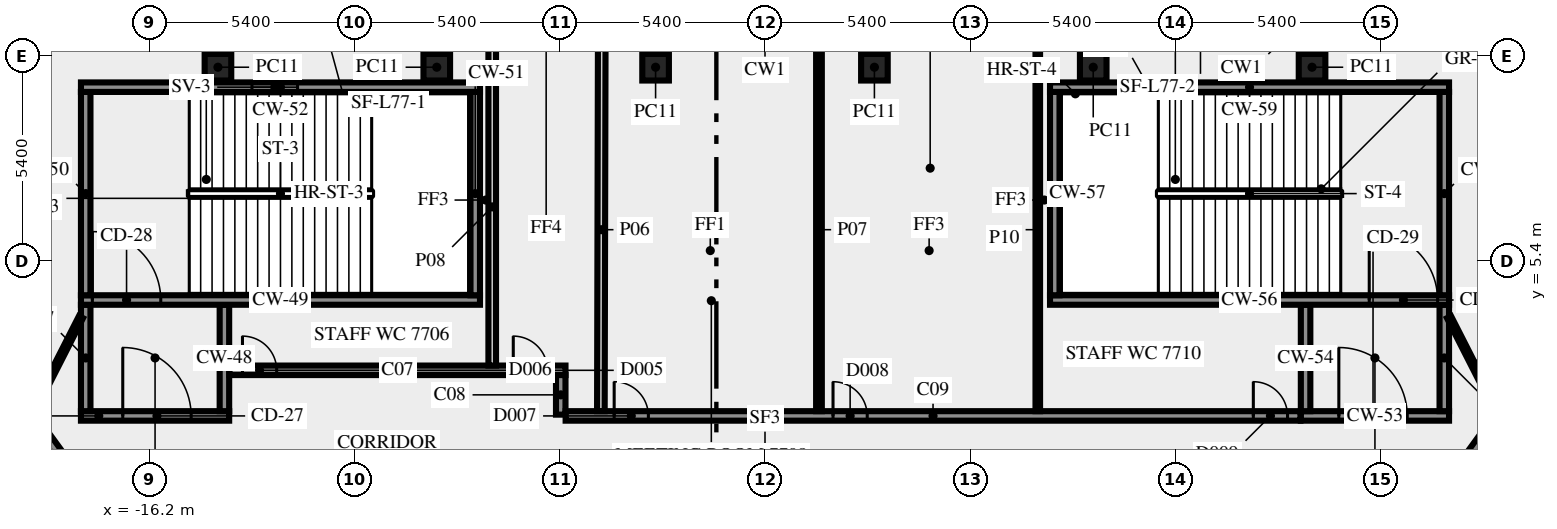
"""IFC4 building model, lengths in metres.
Left out: names, types, materials, properties, quantities, classifications, styles, units other than length and angle.
Written with IfcOpenShell. Run it as: python <this file> out.ifc"""

import sys

from ifc_helpers import new_model, si_unit, direction, frame, frame_2d, origin, origin_2d, place, context, subcontext, project, spatial, rectangle, extrude, element, fill, save


model = new_model("IFC4")
c1 = context("Model", 3, precision=1e-05, world=origin(), true_north=direction((0.0, 1.0)))
c2 = subcontext(c1, "Body", "Model", "MODEL_VIEW")
j1 = project(units=[si_unit("LENGTHUNIT", "METRE"), si_unit("PLANEANGLEUNIT", "RADIAN")], contexts=[c1])
p1 = place(None, origin())
s1 = spatial("IfcSite", under=j1, at=p1, CompositionType="ELEMENT")
p2 = place(p1, origin())
s2 = spatial("IfcBuilding", under=s1, at=p2, CompositionType="ELEMENT")
p3 = place(p2, frame((0.0, 0.0, 331.0)))
s3 = spatial("IfcBuildingStorey", under=s2, at=p3, CompositionType="ELEMENT", Elevation=331.0)
for number, where, z_axis, x_axis in (
    (1, (14.395, 10.5, 0.0), (0.0, 0.0, 1.0), (-1.0, 0.0, 0.0)),
    (2, (8.637, 10.5, 0.0), (0.0, 0.0, 1.0), (-1.0, 0.0, 0.0)),
    (3, (2.879, 10.5, 0.0), (0.0, 0.0, 1.0), (-1.0, 0.0, 0.0)),
    (4, (-2.879, 10.5, 0.0), (0.0, 0.0, 1.0), (-1.0, 0.0, 0.0)),
    (5, (-8.637, 10.5, 0.0), (0.0, 0.0, 1.0), (-1.0, 0.0, 0.0)),
    (6, (-14.395, 10.5, 0.0), (0.0, 0.0, 1.0), (-1.0, 0.0, 0.0)),
):
    element("IfcColumn", number, at=place(p3, frame(where, z_axis=z_axis, x_axis=x_axis)), inside=s3, PredefinedType="COLUMN", context=c2, shape_type="SweptSolid", body=[
        extrude(rectangle(XDim=0.7, YDim=0.7, at=origin_2d()), origin(), (0.0, 0.0, 1.0), 3.65),
    ])
p4 = place(p3, frame((-18.0, 1.325, 0.0), z_axis=(0.0, 0.0, 1.0), x_axis=(1.0, 0.0, 0.0)))
e7 = element("IfcWall", 7, at=p4, inside=s3, PredefinedType="SHEAR", context=c2, shape_type="SweptSolid", body=[
    extrude(rectangle(XDim=3.9, YDim=0.25, at=frame_2d((1.95, 0.0))), origin(), (0.0, 0.0, 1.0), 3.65),
])
p5 = place(p4, frame((1.1, 0.0, 0.0)))
e8 = element("IfcOpeningElement", 8, at=p5, cuts=e7, PredefinedType="OPENING", context=c2, shape_type="SweptSolid", body=[
    extrude(rectangle(XDim=1.8, YDim=2.1, at=frame_2d((0.9, 1.05))), frame((0.0, 0.135, 0.0), z_axis=(0.0, -1.0, 0.0), x_axis=(1.0, 0.0, 0.0)), (0.0, 0.0, 1.0), 0.27),
])
for number, where, z_axis, x_axis in (
    (9, (-17.875, 1.45, 0.0), (0.0, 0.0, 1.0), (0.0, 1.0, 0.0)),
    (10, (-14.225, 1.45, 0.0), (0.0, 0.0, 1.0), (0.0, 1.0, 0.0)),
):
    element("IfcWall", number, at=place(p3, frame(where, z_axis=z_axis, x_axis=x_axis)), inside=s3, PredefinedType="SHEAR", context=c2, shape_type="SweptSolid", body=[
        extrude(rectangle(XDim=2.8, YDim=0.25, at=frame_2d((1.4, 0.0))), origin(), (0.0, 0.0, 1.0), 3.65),
    ])
p6 = place(p3, frame((-18.0, 4.375, 0.0), z_axis=(0.0, 0.0, 1.0), x_axis=(1.0, 0.0, 0.0)))
e11 = element("IfcWall", 11, at=p6, inside=s3, PredefinedType="SHEAR", context=c2, shape_type="SweptSolid", body=[
    extrude(rectangle(XDim=10.5, YDim=0.25, at=frame_2d((5.25, 0.0))), origin(), (0.0, 0.0, 1.0), 3.65),
])
p7 = place(p6, frame((0.3, 0.0, 0.0)))
e12 = element("IfcOpeningElement", 12, at=p7, cuts=e11, PredefinedType="OPENING", context=c2, shape_type="SweptSolid", body=[
    extrude(rectangle(XDim=1.8, YDim=2.1, at=frame_2d((0.9, 1.05))), frame((0.0, 0.135, 0.0), z_axis=(0.0, -1.0, 0.0), x_axis=(1.0, 0.0, 0.0)), (0.0, 0.0, 1.0), 0.27),
])
for number, where, z_axis, x_axis in (
    (13, (-17.875, 4.5, 0.0), (0.0, 0.0, 1.0), (0.0, 1.0, 0.0)),
    (14, (-7.625, 4.5, 0.0), (0.0, 0.0, 1.0), (0.0, 1.0, 0.0)),
):
    element("IfcWall", number, at=place(p3, frame(where, z_axis=z_axis, x_axis=x_axis)), inside=s3, PredefinedType="SHEAR", context=c2, shape_type="SweptSolid", body=[
        extrude(rectangle(XDim=5.35, YDim=0.25, at=frame_2d((2.675, 0.0))), origin(), (0.0, 0.0, 1.0), 3.65),
    ])
p8 = place(p3, frame((-18.0, 9.975, 0.0), z_axis=(0.0, 0.0, 1.0), x_axis=(1.0, 0.0, 0.0)))
e15 = element("IfcWall", 15, at=p8, inside=s3, PredefinedType="SHEAR", context=c2, shape_type="SweptSolid", body=[
    extrude(rectangle(XDim=10.5, YDim=0.25, at=frame_2d((5.25, 0.0))), origin(), (0.0, 0.0, 1.0), 3.65),
])
p9 = place(p8, frame((4.5, 0.0, 1.0)))
e16 = element("IfcOpeningElement", 16, at=p9, cuts=e15, PredefinedType="OPENING", context=c2, shape_type="SweptSolid", body=[
    extrude(rectangle(XDim=1.2, YDim=1.2, at=frame_2d((0.6, 0.6))), frame((0.0, 0.135, 0.0), z_axis=(0.0, -1.0, 0.0), x_axis=(1.0, 0.0, 0.0)), (0.0, 0.0, 1.0), 0.27),
])
p10 = place(p3, frame((14.1, 1.325, 0.0), z_axis=(0.0, 0.0, 1.0), x_axis=(1.0, 0.0, 0.0)))
e17 = element("IfcWall", 17, at=p10, inside=s3, PredefinedType="SHEAR", context=c2, shape_type="SweptSolid", body=[
    extrude(rectangle(XDim=3.9, YDim=0.25, at=frame_2d((1.95, 0.0))), origin(), (0.0, 0.0, 1.0), 3.65),
])
p11 = place(p10, frame((1.0, 0.0, 0.0)))
e18 = element("IfcOpeningElement", 18, at=p11, cuts=e17, PredefinedType="OPENING", context=c2, shape_type="SweptSolid", body=[
    extrude(rectangle(XDim=1.8, YDim=2.1, at=frame_2d((0.9, 1.05))), frame((0.0, 0.135, 0.0), z_axis=(0.0, -1.0, 0.0), x_axis=(1.0, 0.0, 0.0)), (0.0, 0.0, 1.0), 0.27),
])
for number, where, z_axis, x_axis in (
    (19, (14.225, 1.45, 0.0), (0.0, 0.0, 1.0), (0.0, 1.0, 0.0)),
    (20, (17.875, 1.45, 0.0), (0.0, 0.0, 1.0), (0.0, 1.0, 0.0)),
):
    element("IfcWall", number, at=place(p3, frame(where, z_axis=z_axis, x_axis=x_axis)), inside=s3, PredefinedType="SHEAR", context=c2, shape_type="SweptSolid", body=[
        extrude(rectangle(XDim=2.8, YDim=0.25, at=frame_2d((1.4, 0.0))), origin(), (0.0, 0.0, 1.0), 3.65),
    ])
p12 = place(p3, frame((7.5, 4.375, 0.0), z_axis=(0.0, 0.0, 1.0), x_axis=(1.0, 0.0, 0.0)))
e21 = element("IfcWall", 21, at=p12, inside=s3, PredefinedType="SHEAR", context=c2, shape_type="SweptSolid", body=[
    extrude(rectangle(XDim=10.5, YDim=0.25, at=frame_2d((5.25, 0.0))), origin(), (0.0, 0.0, 1.0), 3.65),
])
p13 = place(p12, frame((8.4, 0.0, 0.0)))
e22 = element("IfcOpeningElement", 22, at=p13, cuts=e21, PredefinedType="OPENING", context=c2, shape_type="SweptSolid", body=[
    extrude(rectangle(XDim=1.8, YDim=2.1, at=frame_2d((0.9, 1.05))), frame((0.0, 0.135, 0.0), z_axis=(0.0, -1.0, 0.0), x_axis=(1.0, 0.0, 0.0)), (0.0, 0.0, 1.0), 0.27),
])
for number, where, z_axis, x_axis in (
    (23, (7.625, 4.5, 0.0), (0.0, 0.0, 1.0), (0.0, 1.0, 0.0)),
    (24, (17.875, 4.5, 0.0), (0.0, 0.0, 1.0), (0.0, 1.0, 0.0)),
):
    element("IfcWall", number, at=place(p3, frame(where, z_axis=z_axis, x_axis=x_axis)), inside=s3, PredefinedType="SHEAR", context=c2, shape_type="SweptSolid", body=[
        extrude(rectangle(XDim=5.35, YDim=0.25, at=frame_2d((2.675, 0.0))), origin(), (0.0, 0.0, 1.0), 3.65),
    ])
p14 = place(p3, frame((7.5, 9.975, 0.0), z_axis=(0.0, 0.0, 1.0), x_axis=(1.0, 0.0, 0.0)))
e25 = element("IfcWall", 25, at=p14, inside=s3, PredefinedType="SHEAR", context=c2, shape_type="SweptSolid", body=[
    extrude(rectangle(XDim=10.5, YDim=0.25, at=frame_2d((5.25, 0.0))), origin(), (0.0, 0.0, 1.0), 3.65),
])
p15 = place(p14, frame((2.0, 0.0, 1.0)))
e26 = element("IfcOpeningElement", 26, at=p15, cuts=e25, PredefinedType="OPENING", context=c2, shape_type="SweptSolid", body=[
    extrude(rectangle(XDim=1.2, YDim=1.2, at=frame_2d((0.6, 0.6))), frame((0.0, 0.135, 0.0), z_axis=(0.0, -1.0, 0.0), x_axis=(1.0, 0.0, 0.0)), (0.0, 0.0, 1.0), 0.27),
])
p16 = place(p3, frame((17.545, -1.125, 0.0), z_axis=(0.0, 0.0, 1.0), x_axis=(0.58779555165, 0.809009511354, 0.0)))
e27 = element("IfcWall", 27, at=p16, inside=s3, PredefinedType="SOLIDWALL", context=c2, shape_type="SweptSolid", body=[
    extrude(rectangle(XDim=18.103, YDim=0.25, at=frame_2d((9.052, 0.0))), origin(), (0.0, 0.0, 1.0), 3.65),
])
p17 = place(p16, frame((16.728, 0.0, 0.0)))
e28 = element("IfcOpeningElement", 28, at=p17, cuts=e27, PredefinedType="OPENING", context=c2, shape_type="SweptSolid", body=[
    extrude(rectangle(XDim=0.9, YDim=2.1, at=frame_2d((0.45, 1.05))), frame((0.0, 0.135, 0.0), z_axis=(0.0, -1.0, 0.0), x_axis=(1.0, 0.0, 0.0)), (0.0, 0.0, 1.0), 0.27),
])
p18 = place(p3, frame((-28.039, 13.319, 0.0), z_axis=(0.0, 0.0, 1.0), x_axis=(0.587791911753, -0.809012155952, 0.0)))
e29 = element("IfcWall", 29, at=p18, inside=s3, PredefinedType="SOLIDWALL", context=c2, shape_type="SweptSolid", body=[
    extrude(rectangle(XDim=17.853, YDim=0.25, at=frame_2d((8.927, 0.0))), origin(), (0.0, 0.0, 1.0), 3.65),
])
p19 = place(p18, frame((0.225, 0.0, 0.0)))
e30 = element("IfcOpeningElement", 30, at=p19, cuts=e29, PredefinedType="OPENING", context=c2, shape_type="SweptSolid", body=[
    extrude(rectangle(XDim=0.9, YDim=2.1, at=frame_2d((0.45, 1.05))), frame((0.0, 0.135, 0.0), z_axis=(0.0, -1.0, 0.0), x_axis=(1.0, 0.0, 0.0)), (0.0, 0.0, 1.0), 0.27),
])
p20 = place(p3, frame((-14.09, 2.525, 0.0), z_axis=(0.0, 0.0, 1.0), x_axis=(1.0, 0.0, 0.0)))
e31 = element("IfcWall", 31, at=p20, inside=s3, PredefinedType="SOLIDWALL", context=c2, shape_type="SweptSolid", body=[
    extrude(rectangle(XDim=8.84, YDim=0.25, at=frame_2d((4.42, 0.0))), origin(), (0.0, 0.0, 1.0), 3.65),
])
p21 = place(p20, frame((7.466, 0.0, 0.0)))
e32 = element("IfcOpeningElement", 32, at=p21, cuts=e31, PredefinedType="OPENING", context=c2, shape_type="SweptSolid", body=[
    extrude(rectangle(XDim=0.9, YDim=2.1, at=frame_2d((0.45, 1.05))), frame((0.0, 0.135, 0.0), z_axis=(0.0, -1.0, 0.0), x_axis=(1.0, 0.0, 0.0)), (0.0, 0.0, 1.0), 0.27),
])
p22 = place(p20, frame((0.34, 0.0, 0.0)))
e33 = element("IfcOpeningElement", 33, at=p22, cuts=e31, PredefinedType="OPENING", context=c2, shape_type="SweptSolid", body=[
    extrude(rectangle(XDim=0.9, YDim=2.1, at=frame_2d((0.45, 1.05))), frame((0.0, 0.135, 0.0), z_axis=(0.0, -1.0, 0.0), x_axis=(1.0, 0.0, 0.0)), (0.0, 0.0, 1.0), 0.27),
])
p23 = place(p3, frame((-5.375, 2.4, 0.0), z_axis=(0.0, 0.0, 1.0), x_axis=(0.0, -1.0, 0.0)))
e34 = element("IfcWall", 34, at=p23, inside=s3, PredefinedType="SOLIDWALL", context=c2, shape_type="SweptSolid", body=[
    extrude(rectangle(XDim=1.041, YDim=0.25, at=frame_2d((0.521, 0.0))), origin(), (0.0, 0.0, 1.0), 3.65),
])
p24 = place(p3, frame((-5.246, 1.325, 0.0), z_axis=(0.0, 0.0, 1.0), x_axis=(1.0, 0.0, 0.0)))
e35 = element("IfcWall", 35, at=p24, inside=s3, PredefinedType="SOLIDWALL", context=c2, shape_type="SweptSolid", body=[
    extrude(rectangle(XDim=19.336, YDim=0.25, at=frame_2d((9.668, 0.0))), origin(), (0.0, 0.0, 1.0), 3.65),
])
p25 = place(p24, frame((1.277, 0.0, 0.0)))
e36 = element("IfcOpeningElement", 36, at=p25, cuts=e35, PredefinedType="OPENING", context=c2, shape_type="SweptSolid", body=[
    extrude(rectangle(XDim=0.9, YDim=2.1, at=frame_2d((0.45, 1.05))), frame((0.0, 0.135, 0.0), z_axis=(0.0, -1.0, 0.0), x_axis=(1.0, 0.0, 0.0)), (0.0, 0.0, 1.0), 0.27),
])
p26 = place(p24, frame((7.036, 0.0, 0.0)))
e37 = element("IfcOpeningElement", 37, at=p26, cuts=e35, PredefinedType="OPENING", context=c2, shape_type="SweptSolid", body=[
    extrude(rectangle(XDim=0.9, YDim=2.1, at=frame_2d((0.45, 1.05))), frame((0.0, 0.135, 0.0), z_axis=(0.0, -1.0, 0.0), x_axis=(1.0, 0.0, 0.0)), (0.0, 0.0, 1.0), 0.27),
])
p27 = place(p24, frame((18.096, 0.0, 0.0)))
e38 = element("IfcOpeningElement", 38, at=p27, cuts=e35, PredefinedType="OPENING", context=c2, shape_type="SweptSolid", body=[
    extrude(rectangle(XDim=0.9, YDim=2.1, at=frame_2d((0.45, 1.05))), frame((0.0, 0.135, 0.0), z_axis=(0.0, -1.0, 0.0), x_axis=(1.0, 0.0, 0.0)), (0.0, 0.0, 1.0), 0.27),
])
p28 = place(p3, frame((-4.296, 11.0, 0.0), z_axis=(0.0, 0.0, 1.0), x_axis=(-0.002377476217, -0.999997173799, 0.0)))
e39 = element("IfcWall", 39, at=p28, inside=s3, PredefinedType="SOLIDWALL", context=c2, shape_type="SweptSolid", body=[
    extrude(rectangle(XDim=9.55, YDim=0.2, at=frame_2d((4.775, 0.0))), origin(), (0.0, 0.0, 1.0), 2.95),
])
p29 = place(p3, frame((1.42, 1.45, 0.0), z_axis=(0.0, 0.0, 1.0), x_axis=(0.0, 1.0, 0.0)))
e40 = element("IfcWall", 40, at=p29, inside=s3, PredefinedType="PARTITIONING", context=c2, shape_type="SweptSolid", body=[
    extrude(rectangle(XDim=9.55, YDim=0.15, at=frame_2d((4.775, 0.0))), origin(), (0.0, 0.0, 1.0), 2.95),
])
p30 = place(p3, frame((-7.178, 11.0, 0.0), z_axis=(0.0, 0.0, 1.0), x_axis=(0.0, -1.0, 0.0)))
e41 = element("IfcWall", 41, at=p30, inside=s3, PredefinedType="SOLIDWALL", context=c2, shape_type="SweptSolid", body=[
    extrude(rectangle(XDim=8.35, YDim=0.2, at=frame_2d((4.175, 0.0))), origin(), (0.0, 0.0, 1.0), 2.95),
])
p31 = place(p3, frame((7.178, 1.45, 0.0), z_axis=(0.0, 0.0, 1.0), x_axis=(0.0, 1.0, 0.0)))
e42 = element("IfcWall", 42, at=p31, inside=s3, PredefinedType="PARTITIONING", context=c2, shape_type="SweptSolid", body=[
    extrude(rectangle(XDim=9.55, YDim=0.12, at=frame_2d((4.775, 0.0))), origin(), (0.0, 0.0, 1.0), 2.95),
])
for number, where, z_axis, x_axis in (
    (43, (18.0, 3.925, 0.0), (0.0, 0.0, 1.0), (0.454, -0.891, 0.0)),
    (44, (-19.261, 1.45, 0.0), (0.0, 0.0, 1.0), (0.454, 0.891, 0.0)),
):
    element("IfcWall", number, at=place(p3, frame(where, z_axis=z_axis, x_axis=x_axis)), inside=s3, PredefinedType="PARTITIONING", context=c2, shape_type="SweptSolid", body=[
        extrude(rectangle(XDim=2.778, YDim=0.12, at=frame_2d((1.389, 0.0))), origin(), (0.0, 0.0, 1.0), 3.65),
    ])
p32 = place(p5, origin())
e45 = element("IfcDoor", 45, at=p32, inside=s3, OperationType="DOUBLE_DOOR_SINGLE_SWING", PredefinedType="DOOR", context=c2, shape_type="SweptSolid", body=[
    extrude(rectangle(XDim=1.8, YDim=2.1, at=frame_2d((0.9, 1.05))), frame((0.0, 0.025, 0.0), z_axis=(0.0, -1.0, 0.0), x_axis=(1.0, 0.0, 0.0)), (0.0, 0.0, 1.0), 0.05),
])
fill(e8, e45)
p33 = place(p7, origin())
e46 = element("IfcDoor", 46, at=p33, inside=s3, OperationType="DOUBLE_DOOR_SINGLE_SWING", PredefinedType="DOOR", context=c2, shape_type="SweptSolid", body=[
    extrude(rectangle(XDim=1.8, YDim=2.1, at=frame_2d((0.9, 1.05))), frame((0.0, 0.025, 0.0), z_axis=(0.0, -1.0, 0.0), x_axis=(1.0, 0.0, 0.0)), (0.0, 0.0, 1.0), 0.05),
])
fill(e12, e46)
p34 = place(p9, origin())
e47 = element("IfcWindow", 47, at=p34, inside=s3, PartitioningType="SINGLE_PANEL", PredefinedType="WINDOW", context=c2, shape_type="SweptSolid", body=[
    extrude(rectangle(XDim=1.2, YDim=1.2, at=frame_2d((0.6, 0.6))), frame((0.0, 0.03, 0.0), z_axis=(0.0, -1.0, 0.0), x_axis=(1.0, 0.0, 0.0)), (0.0, 0.0, 1.0), 0.06),
])
fill(e16, e47)
p35 = place(p11, origin())
e48 = element("IfcDoor", 48, at=p35, inside=s3, OperationType="DOUBLE_DOOR_SINGLE_SWING", PredefinedType="DOOR", context=c2, shape_type="SweptSolid", body=[
    extrude(rectangle(XDim=1.8, YDim=2.1, at=frame_2d((0.9, 1.05))), frame((0.0, 0.025, 0.0), z_axis=(0.0, -1.0, 0.0), x_axis=(1.0, 0.0, 0.0)), (0.0, 0.0, 1.0), 0.05),
])
fill(e18, e48)
p36 = place(p13, origin())
e49 = element("IfcDoor", 49, at=p36, inside=s3, OperationType="DOUBLE_DOOR_SINGLE_SWING", PredefinedType="DOOR", context=c2, shape_type="SweptSolid", body=[
    extrude(rectangle(XDim=1.8, YDim=2.1, at=frame_2d((0.9, 1.05))), frame((0.0, 0.025, 0.0), z_axis=(0.0, -1.0, 0.0), x_axis=(1.0, 0.0, 0.0)), (0.0, 0.0, 1.0), 0.05),
])
fill(e22, e49)
p37 = place(p15, origin())
e50 = element("IfcWindow", 50, at=p37, inside=s3, PartitioningType="SINGLE_PANEL", PredefinedType="WINDOW", context=c2, shape_type="SweptSolid", body=[
    extrude(rectangle(XDim=1.2, YDim=1.2, at=frame_2d((0.6, 0.6))), frame((0.0, 0.03, 0.0), z_axis=(0.0, -1.0, 0.0), x_axis=(1.0, 0.0, 0.0)), (0.0, 0.0, 1.0), 0.06),
])
fill(e26, e50)
p38 = place(p25, origin())
e51 = element("IfcDoor", 51, at=p38, inside=s3, OperationType="SINGLE_SWING_LEFT", PredefinedType="DOOR", context=c2, shape_type="SweptSolid", body=[
    extrude(rectangle(XDim=0.9, YDim=2.1, at=frame_2d((0.45, 1.05))), frame((0.0, 0.025, 0.0), z_axis=(0.0, -1.0, 0.0), x_axis=(1.0, 0.0, 0.0)), (0.0, 0.0, 1.0), 0.05),
])
fill(e36, e51)
p39 = place(p21, origin())
e52 = element("IfcDoor", 52, at=p39, inside=s3, OperationType="SINGLE_SWING_RIGHT", PredefinedType="DOOR", context=c2, shape_type="SweptSolid", body=[
    extrude(rectangle(XDim=0.9, YDim=2.1, at=frame_2d((0.45, 1.05))), frame((0.0, 0.025, 0.0), z_axis=(0.0, -1.0, 0.0), x_axis=(1.0, 0.0, 0.0)), (0.0, 0.0, 1.0), 0.05),
])
fill(e32, e52)
p40 = place(p26, origin())
e53 = element("IfcDoor", 53, at=p40, inside=s3, OperationType="SINGLE_SWING_LEFT", PredefinedType="DOOR", context=c2, shape_type="SweptSolid", body=[
    extrude(rectangle(XDim=0.9, YDim=2.1, at=frame_2d((0.45, 1.05))), frame((0.0, 0.025, 0.0), z_axis=(0.0, -1.0, 0.0), x_axis=(1.0, 0.0, 0.0)), (0.0, 0.0, 1.0), 0.05),
])
fill(e37, e53)
p41 = place(p22, origin())
e54 = element("IfcDoor", 54, at=p41, inside=s3, OperationType="SINGLE_SWING_LEFT", PredefinedType="DOOR", context=c2, shape_type="SweptSolid", body=[
    extrude(rectangle(XDim=0.9, YDim=2.1, at=frame_2d((0.45, 1.05))), frame((0.0, 0.025, 0.0), z_axis=(0.0, -1.0, 0.0), x_axis=(1.0, 0.0, 0.0)), (0.0, 0.0, 1.0), 0.05),
])
fill(e33, e54)
p42 = place(p27, origin())
e55 = element("IfcDoor", 55, at=p42, inside=s3, OperationType="SINGLE_SWING_RIGHT", PredefinedType="DOOR", context=c2, shape_type="SweptSolid", body=[
    extrude(rectangle(XDim=0.9, YDim=2.1, at=frame_2d((0.45, 1.05))), frame((0.0, 0.025, 0.0), z_axis=(0.0, -1.0, 0.0), x_axis=(1.0, 0.0, 0.0)), (0.0, 0.0, 1.0), 0.05),
])
fill(e38, e55)
save(model, sys.argv[1])
